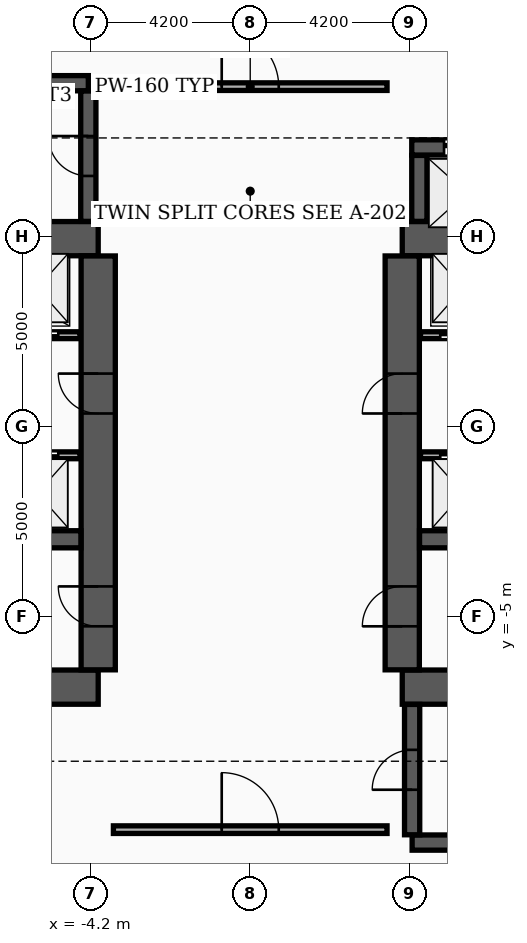
"""IFC4 building model, lengths in metres.
Left out: names, types, materials, properties, quantities, classifications, styles, units other than length and angle.
Written with IfcOpenShell. Run it as: python <this file> out.ifc"""

import sys

from ifc_helpers import new_model, si_unit, direction, frame, frame_2d, origin, place, context, subcontext, project, spatial, rectangle, extrude, element, fill, save


model = new_model("IFC4")
c1 = context("Model", 3, precision=1e-05, world=origin(), true_north=direction((0.0, 1.0)))
c2 = subcontext(c1, "Body", "Model", "MODEL_VIEW")
j1 = project(units=[si_unit("LENGTHUNIT", "METRE"), si_unit("PLANEANGLEUNIT", "RADIAN")], contexts=[c1])
p1 = place(None, origin())
s1 = spatial("IfcSite", under=j1, at=p1, CompositionType="ELEMENT")
p2 = place(p1, origin())
s2 = spatial("IfcBuilding", under=s1, at=p2, CompositionType="ELEMENT")
p3 = place(p2, origin())
s3 = spatial("IfcBuildingStorey", under=s2, at=p3, CompositionType="ELEMENT", Elevation=0.0)
for number, where, z_axis, x_axis in (
    (1, (-12.4, -6.85, 0.0), (0.0, 0.0, 1.0), (1.0, 0.0, 0.0)),
    (2, (-12.4, 4.95, 0.0), (0.0, 0.0, 1.0), (1.0, 0.0, 0.0)),
):
    element("IfcWall", number, at=place(p3, frame(where, z_axis=z_axis, x_axis=x_axis)), inside=s3, PredefinedType="SHEAR", context=c2, shape_type="SweptSolid", body=[
        extrude(rectangle(XDim=8.4, YDim=0.9, at=frame_2d((4.2, 0.0))), origin(), (0.0, 0.0, 1.0), 5.15),
    ])
p4 = place(p3, frame((-4.0, -6.395, 0.0), z_axis=(0.0, 0.0, 1.0), x_axis=(0.0, 1.0, 0.0)))
e3 = element("IfcWall", 3, at=p4, inside=s3, PredefinedType="SHEAR", context=c2, shape_type="SweptSolid", body=[
    extrude(rectangle(XDim=10.89, YDim=0.9, at=frame_2d((5.445, 0.0))), origin(), (0.0, 0.0, 1.0), 5.15),
])
p5 = place(p4, frame((1.145, 0.0, 0.0)))
e4 = element("IfcOpeningElement", 4, at=p5, cuts=e3, PredefinedType="OPENING", context=c2, shape_type="SweptSolid", body=[
    extrude(rectangle(XDim=1.05, YDim=2.15, at=frame_2d((0.525, 1.075))), frame((0.0, 0.46, 0.0), z_axis=(0.0, -1.0, 0.0), x_axis=(1.0, 0.0, 0.0)), (0.0, 0.0, 1.0), 0.92),
])
p6 = place(p4, frame((6.745, 0.0, 0.0)))
e5 = element("IfcOpeningElement", 5, at=p6, cuts=e3, PredefinedType="OPENING", context=c2, shape_type="SweptSolid", body=[
    extrude(rectangle(XDim=1.05, YDim=2.15, at=frame_2d((0.525, 1.075))), frame((0.0, 0.46, 0.0), z_axis=(0.0, -1.0, 0.0), x_axis=(1.0, 0.0, 0.0)), (0.0, 0.0, 1.0), 0.92),
])
p7 = place(p3, frame((-11.945, -2.96, 0.0), z_axis=(0.0, 0.0, 1.0), x_axis=(1.0, 0.0, 0.0)))
e6 = element("IfcWall", 6, at=p7, inside=s3, PredefinedType="SHEAR", context=c2, shape_type="SweptSolid", body=[
    extrude(rectangle(XDim=7.49, YDim=0.45, at=frame_2d((3.745, 0.0))), origin(), (0.0, 0.0, 1.0), 5.15),
])
for number, where, z_axis, x_axis in (
    (7, (4.0, -6.85, 0.0), (0.0, 0.0, 1.0), (1.0, 0.0, 0.0)),
    (8, (4.0, 4.95, 0.0), (0.0, 0.0, 1.0), (1.0, 0.0, 0.0)),
):
    element("IfcWall", number, at=place(p3, frame(where, z_axis=z_axis, x_axis=x_axis)), inside=s3, PredefinedType="SHEAR", context=c2, shape_type="SweptSolid", body=[
        extrude(rectangle(XDim=8.4, YDim=0.9, at=frame_2d((4.2, 0.0))), origin(), (0.0, 0.0, 1.0), 5.15),
    ])
p8 = place(p3, frame((4.0, -6.395, 0.0), z_axis=(0.0, 0.0, 1.0), x_axis=(0.0, 1.0, 0.0)))
e9 = element("IfcWall", 9, at=p8, inside=s3, PredefinedType="SHEAR", context=c2, shape_type="SweptSolid", body=[
    extrude(rectangle(XDim=10.89, YDim=0.9, at=frame_2d((5.445, 0.0))), origin(), (0.0, 0.0, 1.0), 5.15),
])
p9 = place(p8, frame((1.145, 0.0, 0.0)))
e10 = element("IfcOpeningElement", 10, at=p9, cuts=e9, PredefinedType="OPENING", context=c2, shape_type="SweptSolid", body=[
    extrude(rectangle(XDim=1.05, YDim=2.15, at=frame_2d((0.525, 1.075))), frame((0.0, 0.46, 0.0), z_axis=(0.0, -1.0, 0.0), x_axis=(1.0, 0.0, 0.0)), (0.0, 0.0, 1.0), 0.92),
])
p10 = place(p8, frame((6.745, 0.0, 0.0)))
e11 = element("IfcOpeningElement", 11, at=p10, cuts=e9, PredefinedType="OPENING", context=c2, shape_type="SweptSolid", body=[
    extrude(rectangle(XDim=1.05, YDim=2.15, at=frame_2d((0.525, 1.075))), frame((0.0, 0.46, 0.0), z_axis=(0.0, -1.0, 0.0), x_axis=(1.0, 0.0, 0.0)), (0.0, 0.0, 1.0), 0.92),
])
p11 = place(p3, frame((4.455, -2.96, 0.0), z_axis=(0.0, 0.0, 1.0), x_axis=(1.0, 0.0, 0.0)))
e12 = element("IfcWall", 12, at=p11, inside=s3, PredefinedType="SHEAR", context=c2, shape_type="SweptSolid", body=[
    extrude(rectangle(XDim=7.49, YDim=0.45, at=frame_2d((3.745, 0.0))), origin(), (0.0, 0.0, 1.0), 5.15),
])
p12 = place(p3, frame((-12.22, 9.04, 0.0), z_axis=(0.0, 0.0, 1.0), x_axis=(1.0, 0.0, 0.0)))
e13 = element("IfcWall", 13, at=p12, inside=s3, PredefinedType="SHEAR", context=c2, shape_type="SweptSolid", body=[
    extrude(rectangle(XDim=7.96, YDim=0.4, at=frame_2d((3.98, 0.0))), origin(), (0.0, 0.0, 1.0), 5.15),
])
p13 = place(p3, frame((-4.26, 5.405, 0.0), z_axis=(0.0, 0.0, 1.0), x_axis=(0.0, 1.0, 0.0)))
e14 = element("IfcWall", 14, at=p13, inside=s3, PredefinedType="SHEAR", context=c2, shape_type="SweptSolid", body=[
    extrude(rectangle(XDim=3.43, YDim=0.4, at=frame_2d((1.715, 0.0))), origin(), (0.0, 0.0, 1.0), 5.15),
])
p14 = place(p13, frame((1.195, 0.0, 0.0)))
e15 = element("IfcOpeningElement", 15, at=p14, cuts=e14, PredefinedType="OPENING", context=c2, shape_type="SweptSolid", body=[
    extrude(rectangle(XDim=1.05, YDim=2.15, at=frame_2d((0.525, 1.075))), frame((0.0, 0.21, 0.0), z_axis=(0.0, -1.0, 0.0), x_axis=(1.0, 0.0, 0.0)), (0.0, 0.0, 1.0), 0.42),
])
p15 = place(p3, frame((4.26, -10.94, 0.0), z_axis=(0.0, 0.0, 1.0), x_axis=(1.0, 0.0, 0.0)))
e16 = element("IfcWall", 16, at=p15, inside=s3, PredefinedType="SHEAR", context=c2, shape_type="SweptSolid", body=[
    extrude(rectangle(XDim=7.96, YDim=0.4, at=frame_2d((3.98, 0.0))), origin(), (0.0, 0.0, 1.0), 5.15),
])
p16 = place(p3, frame((4.26, -10.735, 0.0), z_axis=(0.0, 0.0, 1.0), x_axis=(0.0, 1.0, 0.0)))
e17 = element("IfcWall", 17, at=p16, inside=s3, PredefinedType="SHEAR", context=c2, shape_type="SweptSolid", body=[
    extrude(rectangle(XDim=3.43, YDim=0.4, at=frame_2d((1.715, 0.0))), origin(), (0.0, 0.0, 1.0), 5.15),
])
p17 = place(p16, frame((1.185, 0.0, 0.0)))
e18 = element("IfcOpeningElement", 18, at=p17, cuts=e17, PredefinedType="OPENING", context=c2, shape_type="SweptSolid", body=[
    extrude(rectangle(XDim=1.05, YDim=2.15, at=frame_2d((0.525, 1.075))), frame((0.0, 0.21, 0.0), z_axis=(0.0, -1.0, 0.0), x_axis=(1.0, 0.0, 0.0)), (0.0, 0.0, 1.0), 0.42),
])
p18 = place(p3, frame((4.45, 5.405, 0.0), z_axis=(0.0, 0.0, 1.0), x_axis=(0.0, 1.0, 0.0)))
e19 = element("IfcWall", 19, at=p18, inside=s3, PredefinedType="SHEAR", context=c2, shape_type="SweptSolid", body=[
    extrude(rectangle(XDim=1.735, YDim=0.4, at=frame_2d((0.867, 0.0))), origin(), (0.0, 0.0, 1.0), 5.15),
])
p19 = place(p3, frame((4.25, 7.35, 0.0), z_axis=(0.0, 0.0, 1.0), x_axis=(1.0, 0.0, 0.0)))
e20 = element("IfcWall", 20, at=p19, inside=s3, PredefinedType="SHEAR", context=c2, shape_type="SweptSolid", body=[
    extrude(rectangle(XDim=5.4, YDim=0.4, at=frame_2d((2.7, 0.0))), origin(), (0.0, 0.0, 1.0), 5.15),
])
p20 = place(p19, frame((0.85, 0.0, 0.0)))
e21 = element("IfcOpeningElement", 21, at=p20, cuts=e20, PredefinedType="OPENING", context=c2, shape_type="SweptSolid", body=[
    extrude(rectangle(XDim=1.2, YDim=2.2, at=frame_2d((0.6, 1.1))), frame((0.0, 0.21, 0.0), z_axis=(0.0, -1.0, 0.0), x_axis=(1.0, 0.0, 0.0)), (0.0, 0.0, 1.0), 0.42),
])
p21 = place(p19, frame((3.25, 0.0, 0.0)))
e22 = element("IfcOpeningElement", 22, at=p21, cuts=e20, PredefinedType="OPENING", context=c2, shape_type="SweptSolid", body=[
    extrude(rectangle(XDim=1.2, YDim=2.2, at=frame_2d((0.6, 1.1))), frame((0.0, 0.21, 0.0), z_axis=(0.0, -1.0, 0.0), x_axis=(1.0, 0.0, 0.0)), (0.0, 0.0, 1.0), 0.42),
])
p22 = place(p3, frame((-11.9, 2.41, 0.0), z_axis=(0.0, 0.0, 1.0), x_axis=(1.0, 0.0, 0.0)))
e23 = element("IfcWall", 23, at=p22, inside=s3, PredefinedType="SOLIDWALL", context=c2, shape_type="SweptSolid", body=[
    extrude(rectangle(XDim=7.42, YDim=0.18, at=frame_2d((3.71, 0.0))), origin(), (0.0, 0.0, 1.0), 2.67),
])
p23 = place(p22, frame((0.55, 0.0, 0.0)))
e24 = element("IfcOpeningElement", 24, at=p23, cuts=e23, PredefinedType="OPENING", context=c2, shape_type="SweptSolid", body=[
    extrude(rectangle(XDim=1.1, YDim=2.15, at=frame_2d((0.55, 1.075))), frame((0.0, 0.1, 0.0), z_axis=(0.0, -1.0, 0.0), x_axis=(1.0, 0.0, 0.0)), (0.0, 0.0, 1.0), 0.2),
])
p24 = place(p22, frame((3.85, 0.0, 0.0)))
e25 = element("IfcOpeningElement", 25, at=p24, cuts=e23, PredefinedType="OPENING", context=c2, shape_type="SweptSolid", body=[
    extrude(rectangle(XDim=1.1, YDim=2.15, at=frame_2d((0.55, 1.075))), frame((0.0, 0.1, 0.0), z_axis=(0.0, -1.0, 0.0), x_axis=(1.0, 0.0, 0.0)), (0.0, 0.0, 1.0), 0.2),
])
p25 = place(p22, frame((5.75, 0.0, 0.0)))
e26 = element("IfcOpeningElement", 26, at=p25, cuts=e23, PredefinedType="OPENING", context=c2, shape_type="SweptSolid", body=[
    extrude(rectangle(XDim=1.1, YDim=2.15, at=frame_2d((0.55, 1.075))), frame((0.0, 0.1, 0.0), z_axis=(0.0, -1.0, 0.0), x_axis=(1.0, 0.0, 0.0)), (0.0, 0.0, 1.0), 0.2),
])
p26 = place(p3, frame((4.48, 2.41, 0.0), z_axis=(0.0, 0.0, 1.0), x_axis=(1.0, 0.0, 0.0)))
e27 = element("IfcWall", 27, at=p26, inside=s3, PredefinedType="SOLIDWALL", context=c2, shape_type="SweptSolid", body=[
    extrude(rectangle(XDim=7.42, YDim=0.18, at=frame_2d((3.71, 0.0))), origin(), (0.0, 0.0, 1.0), 2.67),
])
p27 = place(p26, frame((5.67, 0.0, 0.0)))
e28 = element("IfcOpeningElement", 28, at=p27, cuts=e27, PredefinedType="OPENING", context=c2, shape_type="SweptSolid", body=[
    extrude(rectangle(XDim=1.1, YDim=2.15, at=frame_2d((0.55, 1.075))), frame((0.0, 0.1, 0.0), z_axis=(0.0, -1.0, 0.0), x_axis=(1.0, 0.0, 0.0)), (0.0, 0.0, 1.0), 0.2),
])
p28 = place(p26, frame((0.52, 0.0, 0.0)))
e29 = element("IfcOpeningElement", 29, at=p28, cuts=e27, PredefinedType="OPENING", context=c2, shape_type="SweptSolid", body=[
    extrude(rectangle(XDim=1.1, YDim=2.15, at=frame_2d((0.55, 1.075))), frame((0.0, 0.1, 0.0), z_axis=(0.0, -1.0, 0.0), x_axis=(1.0, 0.0, 0.0)), (0.0, 0.0, 1.0), 0.2),
])
p29 = place(p26, frame((2.42, 0.0, 0.0)))
e30 = element("IfcOpeningElement", 30, at=p29, cuts=e27, PredefinedType="OPENING", context=c2, shape_type="SweptSolid", body=[
    extrude(rectangle(XDim=1.1, YDim=2.15, at=frame_2d((0.55, 1.075))), frame((0.0, 0.1, 0.0), z_axis=(0.0, -1.0, 0.0), x_axis=(1.0, 0.0, 0.0)), (0.0, 0.0, 1.0), 0.2),
])
p30 = place(p3, frame((-11.9, -0.75, 0.0), z_axis=(0.0, 0.0, 1.0), x_axis=(1.0, 0.0, 0.0)))
e31 = element("IfcWall", 31, at=p30, inside=s3, PredefinedType="SOLIDWALL", context=c2, shape_type="SweptSolid", body=[
    extrude(rectangle(XDim=7.42, YDim=0.18, at=frame_2d((3.71, 0.0))), origin(), (0.0, 0.0, 1.0), 2.67),
])
p31 = place(p30, frame((0.45, 0.0, 0.0)))
e32 = element("IfcOpeningElement", 32, at=p31, cuts=e31, PredefinedType="OPENING", context=c2, shape_type="SweptSolid", body=[
    extrude(rectangle(XDim=1.1, YDim=2.15, at=frame_2d((0.55, 1.075))), frame((0.0, 0.1, 0.0), z_axis=(0.0, -1.0, 0.0), x_axis=(1.0, 0.0, 0.0)), (0.0, 0.0, 1.0), 0.2),
])
p32 = place(p30, frame((2.35, 0.0, 0.0)))
e33 = element("IfcOpeningElement", 33, at=p32, cuts=e31, PredefinedType="OPENING", context=c2, shape_type="SweptSolid", body=[
    extrude(rectangle(XDim=1.1, YDim=2.15, at=frame_2d((0.55, 1.075))), frame((0.0, 0.1, 0.0), z_axis=(0.0, -1.0, 0.0), x_axis=(1.0, 0.0, 0.0)), (0.0, 0.0, 1.0), 0.2),
])
p33 = place(p30, frame((5.75, 0.0, 0.0)))
e34 = element("IfcOpeningElement", 34, at=p33, cuts=e31, PredefinedType="OPENING", context=c2, shape_type="SweptSolid", body=[
    extrude(rectangle(XDim=1.1, YDim=2.15, at=frame_2d((0.55, 1.075))), frame((0.0, 0.1, 0.0), z_axis=(0.0, -1.0, 0.0), x_axis=(1.0, 0.0, 0.0)), (0.0, 0.0, 1.0), 0.2),
])
p34 = place(p3, frame((4.48, -0.75, 0.0), z_axis=(0.0, 0.0, 1.0), x_axis=(1.0, 0.0, 0.0)))
e35 = element("IfcWall", 35, at=p34, inside=s3, PredefinedType="SOLIDWALL", context=c2, shape_type="SweptSolid", body=[
    extrude(rectangle(XDim=7.42, YDim=0.18, at=frame_2d((3.71, 0.0))), origin(), (0.0, 0.0, 1.0), 2.67),
])
p35 = place(p34, frame((0.52, 0.0, 0.0)))
e36 = element("IfcOpeningElement", 36, at=p35, cuts=e35, PredefinedType="OPENING", context=c2, shape_type="SweptSolid", body=[
    extrude(rectangle(XDim=1.1, YDim=2.15, at=frame_2d((0.55, 1.075))), frame((0.0, 0.1, 0.0), z_axis=(0.0, -1.0, 0.0), x_axis=(1.0, 0.0, 0.0)), (0.0, 0.0, 1.0), 0.2),
])
p36 = place(p34, frame((3.92, 0.0, 0.0)))
e37 = element("IfcOpeningElement", 37, at=p36, cuts=e35, PredefinedType="OPENING", context=c2, shape_type="SweptSolid", body=[
    extrude(rectangle(XDim=1.1, YDim=2.15, at=frame_2d((0.55, 1.075))), frame((0.0, 0.1, 0.0), z_axis=(0.0, -1.0, 0.0), x_axis=(1.0, 0.0, 0.0)), (0.0, 0.0, 1.0), 0.2),
])
p37 = place(p34, frame((5.82, 0.0, 0.0)))
e38 = element("IfcOpeningElement", 38, at=p37, cuts=e35, PredefinedType="OPENING", context=c2, shape_type="SweptSolid", body=[
    extrude(rectangle(XDim=1.1, YDim=2.15, at=frame_2d((0.55, 1.075))), frame((0.0, 0.1, 0.0), z_axis=(0.0, -1.0, 0.0), x_axis=(1.0, 0.0, 0.0)), (0.0, 0.0, 1.0), 0.2),
])
p38 = place(p3, frame((-3.6, 8.95, 0.0), z_axis=(0.0, 0.0, 1.0), x_axis=(1.0, 0.0, 0.0)))
e39 = element("IfcWall", 39, at=p38, inside=s3, PredefinedType="PARTITIONING", context=c2, shape_type="SweptSolid", body=[
    extrude(rectangle(XDim=7.2, YDim=0.2, at=frame_2d((3.6, 0.0))), origin(), (0.0, 0.0, 1.0), 2.67),
])
p39 = place(p38, frame((2.85, 0.0, 0.0)))
e40 = element("IfcOpeningElement", 40, at=p39, cuts=e39, PredefinedType="OPENING", context=c2, shape_type="SweptSolid", body=[
    extrude(rectangle(XDim=1.5, YDim=2.15, at=frame_2d((0.75, 1.075))), frame((0.0, 0.11, 0.0), z_axis=(0.0, -1.0, 0.0), x_axis=(1.0, 0.0, 0.0)), (0.0, 0.0, 1.0), 0.22),
])
p40 = place(p3, frame((-3.6, -10.6, 0.0), z_axis=(0.0, 0.0, 1.0), x_axis=(1.0, 0.0, 0.0)))
e41 = element("IfcWall", 41, at=p40, inside=s3, PredefinedType="PARTITIONING", context=c2, shape_type="SweptSolid", body=[
    extrude(rectangle(XDim=7.2, YDim=0.2, at=frame_2d((3.6, 0.0))), origin(), (0.0, 0.0, 1.0), 2.67),
])
p41 = place(p40, frame((2.85, 0.0, 0.0)))
e42 = element("IfcOpeningElement", 42, at=p41, cuts=e41, PredefinedType="OPENING", context=c2, shape_type="SweptSolid", body=[
    extrude(rectangle(XDim=1.5, YDim=2.15, at=frame_2d((0.75, 1.075))), frame((0.0, 0.11, 0.0), z_axis=(0.0, -1.0, 0.0), x_axis=(1.0, 0.0, 0.0)), (0.0, 0.0, 1.0), 0.22),
])
p42 = place(p5, origin())
e43 = element("IfcDoor", 43, at=p42, inside=s3, OperationType="SINGLE_SWING_RIGHT", PredefinedType="DOOR", context=c2, shape_type="SweptSolid", body=[
    extrude(rectangle(XDim=1.05, YDim=2.15, at=frame_2d((0.525, 1.075))), frame((0.0, 0.025, 0.0), z_axis=(0.0, -1.0, 0.0), x_axis=(1.0, 0.0, 0.0)), (0.0, 0.0, 1.0), 0.05),
])
fill(e4, e43)
p43 = place(p9, origin())
e44 = element("IfcDoor", 44, at=p43, inside=s3, OperationType="SINGLE_SWING_LEFT", PredefinedType="DOOR", context=c2, shape_type="SweptSolid", body=[
    extrude(rectangle(XDim=1.05, YDim=2.15, at=frame_2d((0.525, 1.075))), frame((0.0, 0.025, 0.0), z_axis=(0.0, -1.0, 0.0), x_axis=(1.0, 0.0, 0.0)), (0.0, 0.0, 1.0), 0.05),
])
fill(e10, e44)
p44 = place(p6, origin())
e45 = element("IfcDoor", 45, at=p44, inside=s3, OperationType="SINGLE_SWING_RIGHT", PredefinedType="DOOR", context=c2, shape_type="SweptSolid", body=[
    extrude(rectangle(XDim=1.05, YDim=2.15, at=frame_2d((0.525, 1.075))), frame((0.0, 0.025, 0.0), z_axis=(0.0, -1.0, 0.0), x_axis=(1.0, 0.0, 0.0)), (0.0, 0.0, 1.0), 0.05),
])
fill(e5, e45)
p45 = place(p10, origin())
e46 = element("IfcDoor", 46, at=p45, inside=s3, OperationType="SINGLE_SWING_LEFT", PredefinedType="DOOR", context=c2, shape_type="SweptSolid", body=[
    extrude(rectangle(XDim=1.05, YDim=2.15, at=frame_2d((0.525, 1.075))), frame((0.0, 0.025, 0.0), z_axis=(0.0, -1.0, 0.0), x_axis=(1.0, 0.0, 0.0)), (0.0, 0.0, 1.0), 0.05),
])
fill(e11, e46)
p46 = place(p14, origin())
e47 = element("IfcDoor", 47, at=p46, inside=s3, OperationType="SINGLE_SWING_RIGHT", PredefinedType="DOOR", context=c2, shape_type="SweptSolid", body=[
    extrude(rectangle(XDim=1.05, YDim=2.15, at=frame_2d((0.525, 1.075))), frame((0.0, 0.025, 0.0), z_axis=(0.0, -1.0, 0.0), x_axis=(1.0, 0.0, 0.0)), (0.0, 0.0, 1.0), 0.05),
])
fill(e15, e47)
p47 = place(p17, origin())
e48 = element("IfcDoor", 48, at=p47, inside=s3, OperationType="SINGLE_SWING_LEFT", PredefinedType="DOOR", context=c2, shape_type="SweptSolid", body=[
    extrude(rectangle(XDim=1.05, YDim=2.15, at=frame_2d((0.525, 1.075))), frame((0.0, 0.025, 0.0), z_axis=(0.0, -1.0, 0.0), x_axis=(1.0, 0.0, 0.0)), (0.0, 0.0, 1.0), 0.05),
])
fill(e18, e48)
p48 = place(p25, origin())
e49 = element("IfcDoor", 49, at=p48, inside=s3, OperationType="DOUBLE_DOOR_SLIDING", PredefinedType="DOOR", context=c2, shape_type="SweptSolid", body=[
    extrude(rectangle(XDim=1.1, YDim=2.15, at=frame_2d((0.55, 1.075))), frame((0.0, 0.025, 0.0), z_axis=(0.0, -1.0, 0.0), x_axis=(1.0, 0.0, 0.0)), (0.0, 0.0, 1.0), 0.05),
])
fill(e26, e49)
p49 = place(p28, origin())
e50 = element("IfcDoor", 50, at=p49, inside=s3, OperationType="DOUBLE_DOOR_SLIDING", PredefinedType="DOOR", context=c2, shape_type="SweptSolid", body=[
    extrude(rectangle(XDim=1.1, YDim=2.15, at=frame_2d((0.55, 1.075))), frame((0.0, 0.025, 0.0), z_axis=(0.0, -1.0, 0.0), x_axis=(1.0, 0.0, 0.0)), (0.0, 0.0, 1.0), 0.05),
])
fill(e29, e50)
p50 = place(p35, origin())
e51 = element("IfcDoor", 51, at=p50, inside=s3, OperationType="DOUBLE_DOOR_SLIDING", PredefinedType="DOOR", context=c2, shape_type="SweptSolid", body=[
    extrude(rectangle(XDim=1.1, YDim=2.15, at=frame_2d((0.55, 1.075))), frame((0.0, 0.025, 0.0), z_axis=(0.0, -1.0, 0.0), x_axis=(1.0, 0.0, 0.0)), (0.0, 0.0, 1.0), 0.05),
])
fill(e36, e51)
p51 = place(p33, origin())
e52 = element("IfcDoor", 52, at=p51, inside=s3, OperationType="DOUBLE_DOOR_SLIDING", PredefinedType="DOOR", context=c2, shape_type="SweptSolid", body=[
    extrude(rectangle(XDim=1.1, YDim=2.15, at=frame_2d((0.55, 1.075))), frame((0.0, 0.025, 0.0), z_axis=(0.0, -1.0, 0.0), x_axis=(1.0, 0.0, 0.0)), (0.0, 0.0, 1.0), 0.05),
])
fill(e34, e52)
p52 = place(p20, origin())
e53 = element("IfcDoor", 53, at=p52, inside=s3, OperationType="DOUBLE_DOOR_SLIDING", PredefinedType="DOOR", context=c2, shape_type="SweptSolid", body=[
    extrude(rectangle(XDim=1.2, YDim=2.2, at=frame_2d((0.6, 1.1))), frame((0.0, 0.025, 0.0), z_axis=(0.0, -1.0, 0.0), x_axis=(1.0, 0.0, 0.0)), (0.0, 0.0, 1.0), 0.05),
])
fill(e21, e53)
p53 = place(p39, origin())
e54 = element("IfcDoor", 54, at=p53, inside=s3, OperationType="DOUBLE_DOOR_SINGLE_SWING", PredefinedType="DOOR", context=c2, shape_type="SweptSolid", body=[
    extrude(rectangle(XDim=1.5, YDim=2.15, at=frame_2d((0.75, 1.075))), frame((0.0, 0.025, 0.0), z_axis=(0.0, -1.0, 0.0), x_axis=(1.0, 0.0, 0.0)), (0.0, 0.0, 1.0), 0.05),
])
fill(e40, e54)
p54 = place(p41, origin())
e55 = element("IfcDoor", 55, at=p54, inside=s3, OperationType="DOUBLE_DOOR_SINGLE_SWING", PredefinedType="DOOR", context=c2, shape_type="SweptSolid", body=[
    extrude(rectangle(XDim=1.5, YDim=2.15, at=frame_2d((0.75, 1.075))), frame((0.0, 0.025, 0.0), z_axis=(0.0, -1.0, 0.0), x_axis=(1.0, 0.0, 0.0)), (0.0, 0.0, 1.0), 0.05),
])
fill(e42, e55)
save(model, sys.argv[1])
